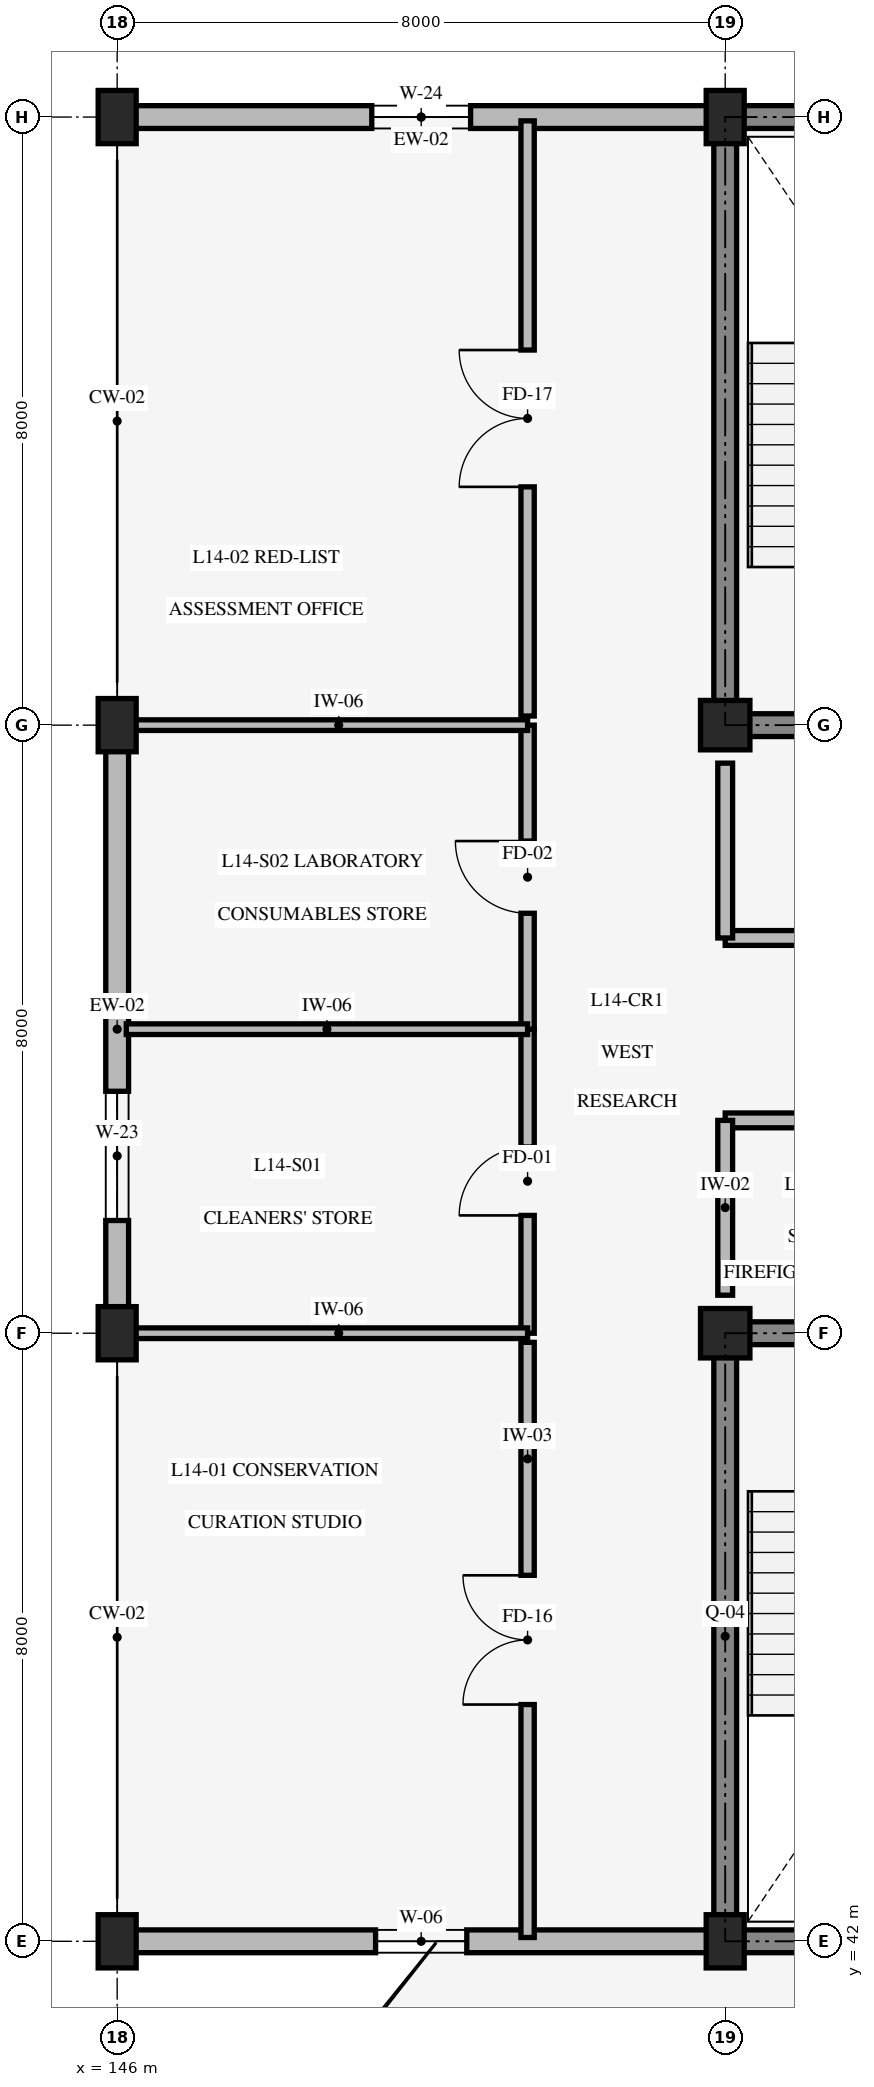
"""IFC4 building model, lengths in metres.
Left out: names, types, materials, properties, quantities, classifications, styles, units other than length and angle.
Written with IfcOpenShell. Run it as: python <this file> out.ifc"""

import sys

from ifc_helpers import new_model, si_unit, direction, frame, frame_2d, origin, origin_2d, place, context, subcontext, project, spatial, rectangle, extrude, element, fill, save


model = new_model("IFC4")
c1 = context("Model", 3, precision=1e-05, world=origin(), true_north=direction((0.0, 1.0)))
c2 = subcontext(c1, "Body", "Model", "MODEL_VIEW")
j1 = project(units=[si_unit("LENGTHUNIT", "METRE"), si_unit("PLANEANGLEUNIT", "RADIAN")], contexts=[c1])
p1 = place(None, origin())
s1 = spatial("IfcSite", under=j1, at=p1, CompositionType="ELEMENT")
p2 = place(p1, origin())
s2 = spatial("IfcBuilding", under=s1, at=p2, CompositionType="ELEMENT")
p3 = place(p2, frame((0.0, 0.0, 57.0)))
s3 = spatial("IfcBuildingStorey", under=s2, at=p3, CompositionType="ELEMENT", Elevation=57.0)
p4 = place(p3, frame((154.0, 42.0, 0.0), z_axis=(0.0, 0.0, 1.0), x_axis=(1.0, 0.0, 0.0)))
e1 = element("IfcWall", 1, at=p4, inside=s3, PredefinedType="SHEAR", context=c2, shape_type="SweptSolid", body=[
    extrude(rectangle(XDim=8.0, YDim=0.3, at=frame_2d((4.0, 0.0))), origin(), (0.0, 0.0, 1.0), 3.95),
])
p5 = place(p3, frame((162.0, 50.0, 0.0), z_axis=(0.0, 0.0, 1.0), x_axis=(-1.0, 0.0, 0.0)))
e2 = element("IfcWall", 2, at=p5, inside=s3, PredefinedType="SHEAR", context=c2, shape_type="SweptSolid", body=[
    extrude(rectangle(XDim=8.0, YDim=0.3, at=frame_2d((4.0, 0.0))), origin(), (0.0, 0.0, 1.0), 3.95),
])
p6 = place(p5, frame((5.3, 0.0, 0.0)))
e3 = element("IfcOpeningElement", 3, at=p6, cuts=e2, PredefinedType="OPENING", context=c2, shape_type="SweptSolid", body=[
    extrude(rectangle(XDim=1.3, YDim=2.15, at=frame_2d((0.65, 1.075))), frame((0.0, 0.16, 0.0), z_axis=(0.0, -1.0, 0.0), x_axis=(1.0, 0.0, 0.0)), (0.0, 0.0, 1.0), 0.32),
])
p7 = place(p5, frame((1.45, 0.0, 0.0)))
e4 = element("IfcOpeningElement", 4, at=p7, cuts=e2, PredefinedType="OPENING", context=c2, shape_type="SweptSolid", body=[
    extrude(rectangle(XDim=1.1, YDim=2.2, at=frame_2d((0.55, 1.1))), frame((0.0, 0.16, 0.0), z_axis=(0.0, -1.0, 0.0), x_axis=(1.0, 0.0, 0.0)), (0.0, 0.0, 1.0), 0.32),
])
p8 = place(p3, frame((154.0, 50.0, 0.0), z_axis=(0.0, 0.0, 1.0), x_axis=(0.0, -1.0, 0.0)))
e5 = element("IfcWall", 5, at=p8, inside=s3, PredefinedType="SHEAR", context=c2, shape_type="SweptSolid", body=[
    extrude(rectangle(XDim=8.0, YDim=0.3, at=frame_2d((4.0, 0.0))), origin(), (0.0, 0.0, 1.0), 3.95),
])
p9 = place(p3, frame((154.0, 58.0, 0.0), z_axis=(0.0, 0.0, 1.0), x_axis=(1.0, 0.0, 0.0)))
e6 = element("IfcWall", 6, at=p9, inside=s3, PredefinedType="SHEAR", context=c2, shape_type="SweptSolid", body=[
    extrude(rectangle(XDim=8.0, YDim=0.3, at=frame_2d((4.0, 0.0))), origin(), (0.0, 0.0, 1.0), 3.95),
])
p10 = place(p9, frame((1.4, 0.0, 0.0)))
e7 = element("IfcOpeningElement", 7, at=p10, cuts=e6, PredefinedType="OPENING", context=c2, shape_type="SweptSolid", body=[
    extrude(rectangle(XDim=1.3, YDim=2.15, at=frame_2d((0.65, 1.075))), frame((0.0, 0.16, 0.0), z_axis=(0.0, -1.0, 0.0), x_axis=(1.0, 0.0, 0.0)), (0.0, 0.0, 1.0), 0.32),
])
p11 = place(p9, frame((5.3, 0.0, 0.0)))
e8 = element("IfcOpeningElement", 8, at=p11, cuts=e6, PredefinedType="OPENING", context=c2, shape_type="SweptSolid", body=[
    extrude(rectangle(XDim=1.1, YDim=2.2, at=frame_2d((0.55, 1.1))), frame((0.0, 0.16, 0.0), z_axis=(0.0, -1.0, 0.0), x_axis=(1.0, 0.0, 0.0)), (0.0, 0.0, 1.0), 0.32),
])
for number, where, z_axis, x_axis in (
    (9, (162.0, 66.0, 0.0), (0.0, 0.0, 1.0), (-1.0, 0.0, 0.0)),
    (10, (154.0, 66.0, 0.0), (0.0, 0.0, 1.0), (0.0, -1.0, 0.0)),
):
    element("IfcWall", number, at=place(p3, frame(where, z_axis=z_axis, x_axis=x_axis)), inside=s3, PredefinedType="SHEAR", context=c2, shape_type="SweptSolid", body=[
        extrude(rectangle(XDim=8.0, YDim=0.3, at=frame_2d((4.0, 0.0))), origin(), (0.0, 0.0, 1.0), 3.95),
    ])
for number, where, z_axis, x_axis in (
    (11, (146.0, 42.0, 0.0), (0.0, 0.0, 1.0), (1.0, 0.0, 0.0)),
    (12, (146.0, 50.0, 0.0), (0.0, 0.0, 1.0), (1.0, 0.0, 0.0)),
    (13, (146.0, 58.0, 0.0), (0.0, 0.0, 1.0), (1.0, 0.0, 0.0)),
    (14, (146.0, 66.0, 0.0), (0.0, 0.0, 1.0), (1.0, 0.0, 0.0)),
    (15, (154.0, 42.0, 0.0), (0.0, 0.0, 1.0), (1.0, 0.0, 0.0)),
):
    element("IfcColumn", number, at=place(p3, frame(where, z_axis=z_axis, x_axis=x_axis)), inside=s3, PredefinedType="COLUMN", context=c2, shape_type="SweptSolid", body=[
        extrude(rectangle(XDim=0.5, YDim=0.7, at=origin_2d()), origin(), (0.0, 0.0, 1.0), 4.2),
    ])
for number, where, z_axis, x_axis in (
    (16, (154.0, 50.0, 0.0), (0.0, 0.0, 1.0), (1.0, 0.0, 0.0)),
    (17, (154.0, 58.0, 0.0), (0.0, 0.0, 1.0), (1.0, 0.0, 0.0)),
):
    element("IfcColumn", number, at=place(p3, frame(where, z_axis=z_axis, x_axis=x_axis)), inside=s3, PredefinedType="COLUMN", context=c2, shape_type="SweptSolid", body=[
        extrude(rectangle(XDim=0.65, YDim=0.65, at=origin_2d()), origin(), (0.0, 0.0, 1.0), 4.2),
    ])
p12 = place(p3, frame((154.0, 66.0, 0.0), z_axis=(0.0, 0.0, 1.0), x_axis=(1.0, 0.0, 0.0)))
e18 = element("IfcColumn", 18, at=p12, inside=s3, PredefinedType="COLUMN", context=c2, shape_type="SweptSolid", body=[
    extrude(rectangle(XDim=0.5, YDim=0.7, at=origin_2d()), origin(), (0.0, 0.0, 1.0), 4.2),
])
p13 = place(p3, frame((154.0, 42.0, 0.0), z_axis=(0.0, 0.0, 1.0), x_axis=(-1.0, 0.0, 0.0)))
e19 = element("IfcWall", 19, at=p13, inside=s3, PredefinedType="STANDARD", context=c2, shape_type="SweptSolid", body=[
    extrude(rectangle(XDim=8.0, YDim=0.3, at=frame_2d((4.0, 0.0))), origin(), (0.0, 0.0, 1.0), 3.34),
])
p14 = place(p13, frame((3.4, 0.0, 0.85)))
e20 = element("IfcOpeningElement", 20, at=p14, cuts=e19, PredefinedType="OPENING", context=c2, shape_type="SweptSolid", body=[
    extrude(rectangle(XDim=1.2, YDim=1.2, at=frame_2d((0.6, 0.6))), frame((0.0, 0.16, 0.0), z_axis=(0.0, -1.0, 0.0), x_axis=(1.0, 0.0, 0.0)), (0.0, 0.0, 1.0), 0.32),
])
p15 = place(p3, frame((146.0, 50.0, 0.0), z_axis=(0.0, 0.0, 1.0), x_axis=(0.0, 1.0, 0.0)))
e21 = element("IfcWall", 21, at=p15, inside=s3, PredefinedType="STANDARD", context=c2, shape_type="SweptSolid", body=[
    extrude(rectangle(XDim=8.0, YDim=0.3, at=frame_2d((4.0, 0.0))), origin(), (0.0, 0.0, 1.0), 3.34),
])
p16 = place(p15, frame((1.483, 0.0, 0.85)))
e22 = element("IfcOpeningElement", 22, at=p16, cuts=e21, PredefinedType="OPENING", context=c2, shape_type="SweptSolid", body=[
    extrude(rectangle(XDim=1.7, YDim=1.2, at=frame_2d((0.85, 0.6))), frame((0.0, 0.16, 0.0), z_axis=(0.0, -1.0, 0.0), x_axis=(1.0, 0.0, 0.0)), (0.0, 0.0, 1.0), 0.32),
])
p17 = place(p3, frame((146.0, 66.0, 0.0), z_axis=(0.0, 0.0, 1.0), x_axis=(1.0, 0.0, 0.0)))
e23 = element("IfcWall", 23, at=p17, inside=s3, PredefinedType="STANDARD", context=c2, shape_type="SweptSolid", body=[
    extrude(rectangle(XDim=8.0, YDim=0.3, at=frame_2d((4.0, 0.0))), origin(), (0.0, 0.0, 1.0), 3.34),
])
p18 = place(p17, frame((3.35, 0.0, 0.85)))
e24 = element("IfcOpeningElement", 24, at=p18, cuts=e23, PredefinedType="OPENING", context=c2, shape_type="SweptSolid", body=[
    extrude(rectangle(XDim=1.3, YDim=1.7, at=frame_2d((0.65, 0.85))), frame((0.0, 0.16, 0.0), z_axis=(0.0, -1.0, 0.0), x_axis=(1.0, 0.0, 0.0)), (0.0, 0.0, 1.0), 0.32),
])
p19 = place(p3, frame((154.0, 52.8, 0.0), z_axis=(0.0, 0.0, 1.0), x_axis=(1.0, 0.0, 0.0)))
e25 = element("IfcWall", 25, at=p19, inside=s3, PredefinedType="STANDARD", context=c2, shape_type="SweptSolid", body=[
    extrude(rectangle(XDim=7.6, YDim=0.195, at=frame_2d((3.8, 0.0))), origin(), (0.0, 0.0, 1.0), 3.9),
])
p20 = place(p19, frame((2.8, 0.0, 0.0)))
e26 = element("IfcOpeningElement", 26, at=p20, cuts=e25, PredefinedType="OPENING", context=c2, shape_type="SweptSolid", body=[
    extrude(rectangle(XDim=1.3, YDim=2.15, at=frame_2d((0.65, 1.075))), frame((0.0, 0.107, 0.0), z_axis=(0.0, -1.0, 0.0), x_axis=(1.0, 0.0, 0.0)), (0.0, 0.0, 1.0), 0.215),
])
p21 = place(p3, frame((154.0, 50.5, 0.0), z_axis=(0.0, 0.0, 1.0), x_axis=(0.0, 1.0, 0.0)))
e27 = element("IfcWall", 27, at=p21, inside=s3, PredefinedType="STANDARD", context=c2, shape_type="SweptSolid", body=[
    extrude(rectangle(XDim=2.3, YDim=0.195, at=frame_2d((1.15, 0.0))), origin(), (0.0, 0.0, 1.0), 3.34),
])
p22 = place(p3, frame((154.0, 55.2, 0.0), z_axis=(0.0, 0.0, 1.0), x_axis=(1.0, 0.0, 0.0)))
e28 = element("IfcWall", 28, at=p22, inside=s3, PredefinedType="STANDARD", context=c2, shape_type="SweptSolid", body=[
    extrude(rectangle(XDim=7.6, YDim=0.195, at=frame_2d((3.8, 0.0))), origin(), (0.0, 0.0, 1.0), 3.9),
])
p23 = place(p22, frame((2.8, 0.0, 0.0)))
e29 = element("IfcOpeningElement", 29, at=p23, cuts=e28, PredefinedType="OPENING", context=c2, shape_type="SweptSolid", body=[
    extrude(rectangle(XDim=1.4, YDim=2.2, at=frame_2d((0.7, 1.1))), frame((0.0, 0.107, 0.0), z_axis=(0.0, -1.0, 0.0), x_axis=(1.0, 0.0, 0.0)), (0.0, 0.0, 1.0), 0.215),
])
p24 = place(p3, frame((154.0, 55.2, 0.0), z_axis=(0.0, 0.0, 1.0), x_axis=(0.0, 1.0, 0.0)))
e30 = element("IfcWall", 30, at=p24, inside=s3, PredefinedType="STANDARD", context=c2, shape_type="SweptSolid", body=[
    extrude(rectangle(XDim=2.3, YDim=0.195, at=frame_2d((1.15, 0.0))), origin(), (0.0, 0.0, 1.0), 3.34),
])
p25 = place(p3, frame((151.4, 42.05, 0.0), z_axis=(0.0, 0.0, 1.0), x_axis=(0.0, 1.0, 0.0)))
e31 = element("IfcWall", 31, at=p25, inside=s3, PredefinedType="STANDARD", context=c2, shape_type="SweptSolid", body=[
    extrude(rectangle(XDim=7.83, YDim=0.175, at=frame_2d((3.915, 0.0))), origin(), (0.0, 0.0, 1.0), 3.9),
])
p26 = place(p25, frame((3.065, 0.0, 0.0)))
e32 = element("IfcOpeningElement", 32, at=p26, cuts=e31, PredefinedType="OPENING", context=c2, shape_type="SweptSolid", body=[
    extrude(rectangle(XDim=1.7, YDim=2.3, at=frame_2d((0.85, 1.15))), frame((0.0, 0.098, 0.0), z_axis=(0.0, -1.0, 0.0), x_axis=(1.0, 0.0, 0.0)), (0.0, 0.0, 1.0), 0.195),
])
p27 = place(p3, frame((151.4, 58.12, 0.0), z_axis=(0.0, 0.0, 1.0), x_axis=(0.0, 1.0, 0.0)))
e33 = element("IfcWall", 33, at=p27, inside=s3, PredefinedType="STANDARD", context=c2, shape_type="SweptSolid", body=[
    extrude(rectangle(XDim=7.83, YDim=0.175, at=frame_2d((3.915, 0.0))), origin(), (0.0, 0.0, 1.0), 3.9),
])
p28 = place(p27, frame((3.015, 0.0, 0.0)))
e34 = element("IfcOpeningElement", 34, at=p28, cuts=e33, PredefinedType="OPENING", context=c2, shape_type="SweptSolid", body=[
    extrude(rectangle(XDim=1.8, YDim=2.3, at=frame_2d((0.9, 1.15))), frame((0.0, 0.098, 0.0), z_axis=(0.0, -1.0, 0.0), x_axis=(1.0, 0.0, 0.0)), (0.0, 0.0, 1.0), 0.195),
])
p29 = place(p3, frame((151.4, 50.0, 0.0), z_axis=(0.0, 0.0, 1.0), x_axis=(0.0, 1.0, 0.0)))
e35 = element("IfcWall", 35, at=p29, inside=s3, PredefinedType="STANDARD", context=c2, shape_type="SweptSolid", body=[
    extrude(rectangle(XDim=4.0, YDim=0.175, at=frame_2d((2.0, 0.0))), origin(), (0.0, 0.0, 1.0), 3.9),
])
p30 = place(p29, frame((1.55, 0.0, 0.0)))
e36 = element("IfcOpeningElement", 36, at=p30, cuts=e35, PredefinedType="OPENING", context=c2, shape_type="SweptSolid", body=[
    extrude(rectangle(XDim=0.9, YDim=2.1, at=frame_2d((0.45, 1.05))), frame((0.0, 0.098, 0.0), z_axis=(0.0, -1.0, 0.0), x_axis=(1.0, 0.0, 0.0)), (0.0, 0.0, 1.0), 0.195),
])
p31 = place(p3, frame((151.4, 54.0, 0.0), z_axis=(0.0, 0.0, 1.0), x_axis=(0.0, 1.0, 0.0)))
e37 = element("IfcWall", 37, at=p31, inside=s3, PredefinedType="STANDARD", context=c2, shape_type="SweptSolid", body=[
    extrude(rectangle(XDim=4.0, YDim=0.175, at=frame_2d((2.0, 0.0))), origin(), (0.0, 0.0, 1.0), 3.9),
])
p32 = place(p31, frame((1.525, 0.0, 0.0)))
e38 = element("IfcOpeningElement", 38, at=p32, cuts=e37, PredefinedType="OPENING", context=c2, shape_type="SweptSolid", body=[
    extrude(rectangle(XDim=0.95, YDim=2.1, at=frame_2d((0.475, 1.05))), frame((0.0, 0.098, 0.0), z_axis=(0.0, -1.0, 0.0), x_axis=(1.0, 0.0, 0.0)), (0.0, 0.0, 1.0), 0.195),
])
p33 = place(p3, frame((146.12, 50.0, 0.0), z_axis=(0.0, 0.0, 1.0), x_axis=(1.0, 0.0, 0.0)))
e39 = element("IfcWall", 39, at=p33, inside=s3, PredefinedType="STANDARD", context=c2, shape_type="SweptSolid", body=[
    extrude(rectangle(XDim=5.28, YDim=0.14, at=frame_2d((2.64, 0.0))), origin(), (0.0, 0.0, 1.0), 3.29),
])
p34 = place(p3, frame((146.12, 54.0, 0.0), z_axis=(0.0, 0.0, 1.0), x_axis=(1.0, 0.0, 0.0)))
e40 = element("IfcWall", 40, at=p34, inside=s3, PredefinedType="STANDARD", context=c2, shape_type="SweptSolid", body=[
    extrude(rectangle(XDim=5.28, YDim=0.14, at=frame_2d((2.64, 0.0))), origin(), (0.0, 0.0, 1.0), 3.9),
])
p35 = place(p3, frame((146.12, 58.0, 0.0), z_axis=(0.0, 0.0, 1.0), x_axis=(1.0, 0.0, 0.0)))
e41 = element("IfcWall", 41, at=p35, inside=s3, PredefinedType="STANDARD", context=c2, shape_type="SweptSolid", body=[
    extrude(rectangle(XDim=5.28, YDim=0.14, at=frame_2d((2.64, 0.0))), origin(), (0.0, 0.0, 1.0), 3.29),
])
p36 = place(p14, origin())
e42 = element("IfcWindow", 42, at=p36, inside=s3, PartitioningType="SINGLE_PANEL", PredefinedType="WINDOW", context=c2, shape_type="SweptSolid", body=[
    extrude(rectangle(XDim=1.2, YDim=1.2, at=frame_2d((0.6, 0.6))), frame((0.0, 0.03, 0.0), z_axis=(0.0, -1.0, 0.0), x_axis=(1.0, 0.0, 0.0)), (0.0, 0.0, 1.0), 0.06),
])
fill(e20, e42)
p37 = place(p16, origin())
e43 = element("IfcWindow", 43, at=p37, inside=s3, PartitioningType="SINGLE_PANEL", PredefinedType="WINDOW", context=c2, shape_type="SweptSolid", body=[
    extrude(rectangle(XDim=1.7, YDim=1.2, at=frame_2d((0.85, 0.6))), frame((0.0, 0.03, 0.0), z_axis=(0.0, -1.0, 0.0), x_axis=(1.0, 0.0, 0.0)), (0.0, 0.0, 1.0), 0.06),
])
fill(e22, e43)
p38 = place(p18, origin())
e44 = element("IfcWindow", 44, at=p38, inside=s3, PartitioningType="SINGLE_PANEL", PredefinedType="WINDOW", context=c2, shape_type="SweptSolid", body=[
    extrude(rectangle(XDim=1.3, YDim=1.7, at=frame_2d((0.65, 0.85))), frame((0.0, 0.03, 0.0), z_axis=(0.0, -1.0, 0.0), x_axis=(1.0, 0.0, 0.0)), (0.0, 0.0, 1.0), 0.06),
])
fill(e24, e44)
p39 = place(p26, origin())
e45 = element("IfcDoor", 45, at=p39, inside=s3, OperationType="DOUBLE_DOOR_SINGLE_SWING", PredefinedType="DOOR", context=c2, shape_type="SweptSolid", body=[
    extrude(rectangle(XDim=1.7, YDim=2.3, at=frame_2d((0.85, 1.15))), frame((0.0, 0.025, 0.0), z_axis=(0.0, -1.0, 0.0), x_axis=(1.0, 0.0, 0.0)), (0.0, 0.0, 1.0), 0.05),
])
fill(e32, e45)
p40 = place(p28, origin())
e46 = element("IfcDoor", 46, at=p40, inside=s3, OperationType="DOUBLE_DOOR_SINGLE_SWING", PredefinedType="DOOR", context=c2, shape_type="SweptSolid", body=[
    extrude(rectangle(XDim=1.8, YDim=2.3, at=frame_2d((0.9, 1.15))), frame((0.0, 0.025, 0.0), z_axis=(0.0, -1.0, 0.0), x_axis=(1.0, 0.0, 0.0)), (0.0, 0.0, 1.0), 0.05),
])
fill(e34, e46)
p41 = place(p30, origin())
e47 = element("IfcDoor", 47, at=p41, inside=s3, OperationType="SINGLE_SWING_LEFT", PredefinedType="DOOR", context=c2, shape_type="SweptSolid", body=[
    extrude(rectangle(XDim=0.9, YDim=2.1, at=frame_2d((0.45, 1.05))), frame((0.0, 0.025, 0.0), z_axis=(0.0, -1.0, 0.0), x_axis=(1.0, 0.0, 0.0)), (0.0, 0.0, 1.0), 0.05),
])
fill(e36, e47)
p42 = place(p32, origin())
e48 = element("IfcDoor", 48, at=p42, inside=s3, OperationType="SINGLE_SWING_RIGHT", PredefinedType="DOOR", context=c2, shape_type="SweptSolid", body=[
    extrude(rectangle(XDim=0.95, YDim=2.1, at=frame_2d((0.475, 1.05))), frame((0.0, 0.025, 0.0), z_axis=(0.0, -1.0, 0.0), x_axis=(1.0, 0.0, 0.0)), (0.0, 0.0, 1.0), 0.05),
])
fill(e38, e48)
save(model, sys.argv[1])
